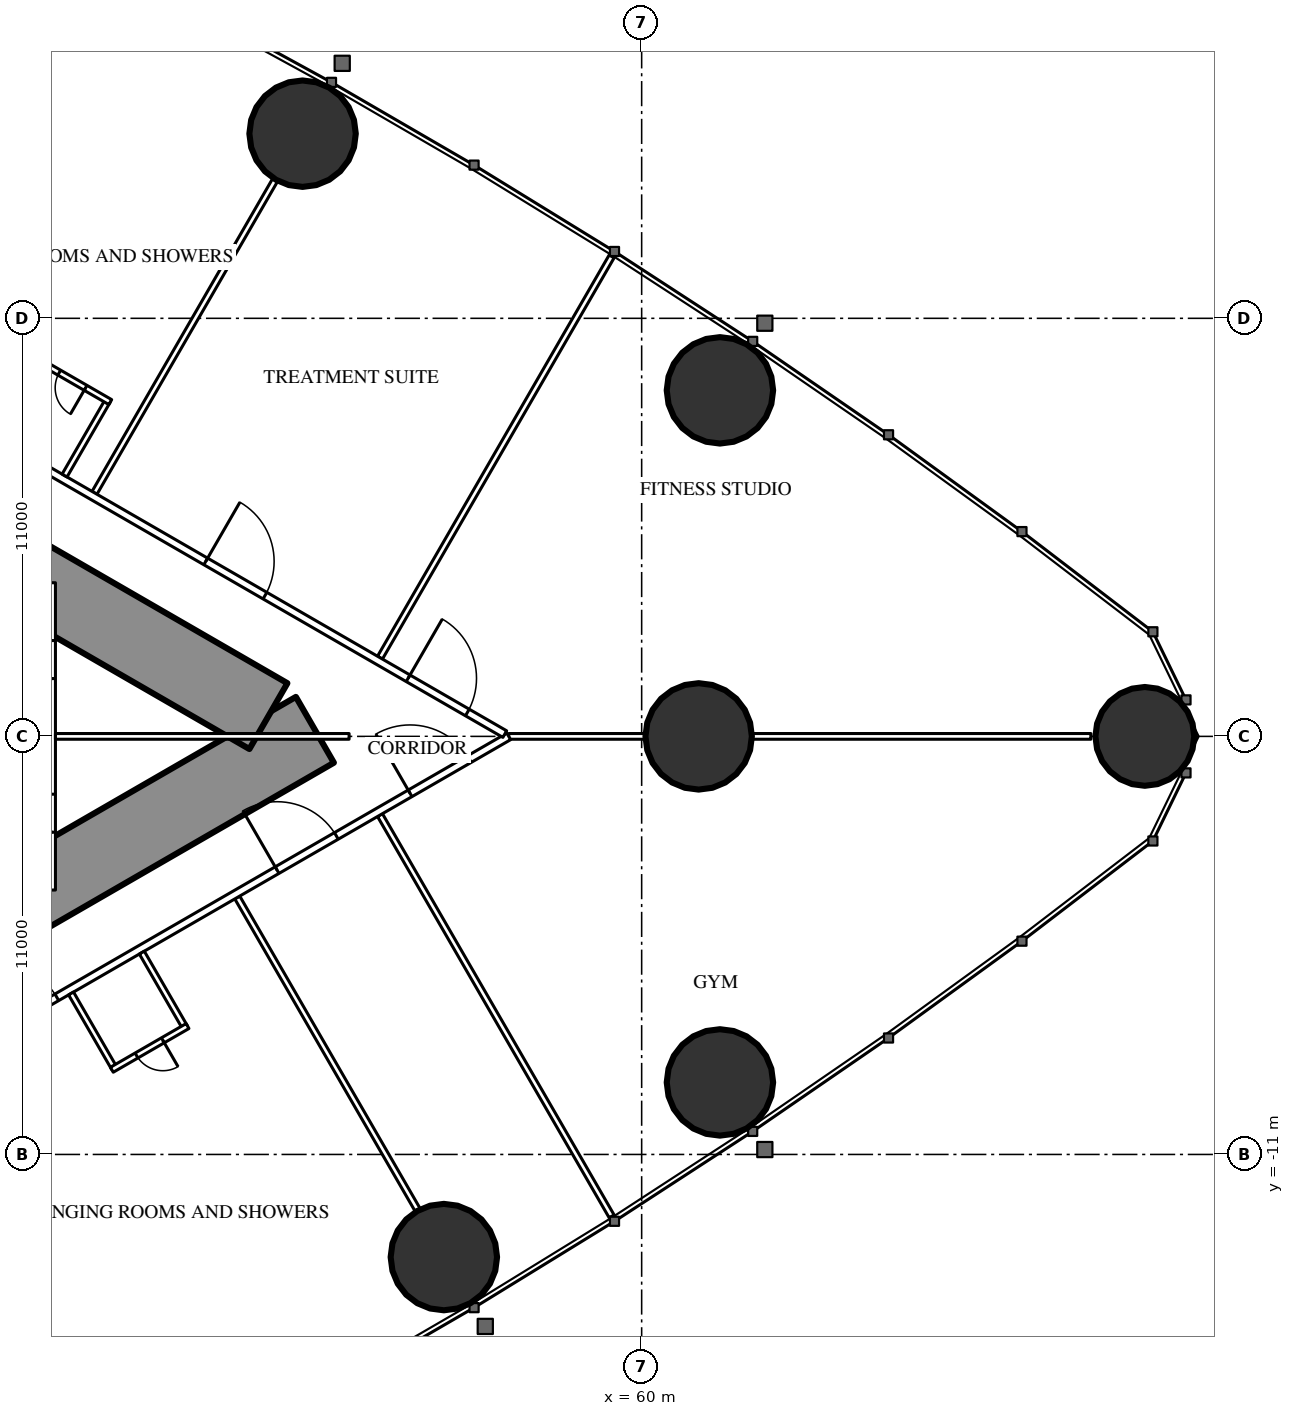
"""IFC4 building model, lengths in metres.
Left out: names, types, materials, properties, quantities, classifications, styles, units other than length and angle.
Written with IfcOpenShell. Run it as: python <this file> out.ifc"""

import sys

from ifc_helpers import new_model, si_unit, direction, frame, frame_2d, origin, origin_2d, place, context, subcontext, project, spatial, rectangle, hollow_circle, extrude, element, fill, save


model = new_model("IFC4")
c1 = context("Model", 3, precision=1e-05, world=origin(), true_north=direction((0.0, 1.0)))
c2 = subcontext(c1, "Body", "Model", "MODEL_VIEW")
j1 = project(units=[si_unit("LENGTHUNIT", "METRE"), si_unit("PLANEANGLEUNIT", "RADIAN")], contexts=[c1])
p1 = place(None, origin())
s1 = spatial("IfcSite", under=j1, at=p1, CompositionType="ELEMENT")
p2 = place(p1, origin())
s2 = spatial("IfcBuilding", under=s1, at=p2, CompositionType="ELEMENT")
p3 = place(p2, frame((0.0, 0.0, 12.6)))
s3 = spatial("IfcBuildingStorey", under=s2, at=p3, CompositionType="ELEMENT", Elevation=12.6)
p4 = place(p3, frame((73.239, 0.0, 0.0), z_axis=(0.0, 0.0, 1.0), x_axis=(1.0, 0.0, 0.0)))
e1 = element("IfcColumn", 1, at=p4, inside=s3, PredefinedType="COLUMN", context=c2, shape_type="SweptSolid", body=[
    extrude(hollow_circle(Radius=1.3, WallThickness=0.1, at=origin_2d()), origin(), (0.0, 0.0, 1.0), 5.4),
])
for number, where, z_axis, x_axis in (
    (2, (62.059, 9.105, 0.0), (0.0, 0.0, 1.0), (1.0, 0.0, 0.0)),
    (3, (51.078, 15.858, 0.0), (0.0, 0.0, 1.0), (1.0, 0.0, 0.0)),
    (4, (54.795, -13.701, 0.0), (0.0, 0.0, 1.0), (1.0, 0.0, 0.0)),
    (5, (62.059, -9.105, 0.0), (0.0, 0.0, 1.0), (1.0, 0.0, 0.0)),
):
    element("IfcColumn", number, at=place(p3, frame(where, z_axis=z_axis, x_axis=x_axis)), inside=s3, PredefinedType="COLUMN", context=c2, shape_type="SweptSolid", body=[
        extrude(hollow_circle(Radius=1.4, WallThickness=0.12, at=origin_2d()), origin(), (0.0, 0.0, 1.0), 5.4),
    ])
p5 = place(p3, frame((61.5, 0.0, 0.0), z_axis=(0.0, 0.0, 1.0), x_axis=(1.0, 0.0, 0.0)))
e6 = element("IfcColumn", 6, at=p5, inside=s3, PredefinedType="COLUMN", context=c2, shape_type="SweptSolid", body=[
    extrude(hollow_circle(Radius=1.4, WallThickness=0.1, at=origin_2d()), origin(), (0.0, 0.0, 1.0), 5.4),
])
p6 = place(p3, frame((27.2, -13.8, 0.0), z_axis=(0.0, 0.0, 1.0), x_axis=(0.866027159892, 0.499996958321, 0.0)))
e7 = element("IfcWall", 7, at=p6, inside=s3, PredefinedType="SHEAR", context=c2, shape_type="SweptSolid", body=[
    extrude(rectangle(XDim=27.947, YDim=2.0, at=frame_2d((13.973, 0.0))), origin(), (0.0, 0.0, 1.0), 5.4),
])
p7 = place(p6, frame((4.6, 0.0, 0.0)))
e8 = element("IfcOpeningElement", 8, at=p7, cuts=e7, PredefinedType="OPENING", context=c2, shape_type="SweptSolid", body=[
    extrude(rectangle(XDim=1.0, YDim=2.2, at=frame_2d((0.5, 1.1))), frame((0.0, 1.01, 0.0), z_axis=(0.0, -1.0, 0.0), x_axis=(1.0, 0.0, 0.0)), (0.0, 0.0, 1.0), 2.02),
])
p8 = place(p6, frame((13.395, 0.0, 0.0)))
e9 = element("IfcOpeningElement", 9, at=p8, cuts=e7, PredefinedType="OPENING", context=c2, shape_type="SweptSolid", body=[
    extrude(rectangle(XDim=1.8, YDim=2.2, at=frame_2d((0.9, 1.1))), frame((0.0, 1.01, 0.0), z_axis=(0.0, -1.0, 0.0), x_axis=(1.0, 0.0, 0.0)), (0.0, 0.0, 1.0), 2.02),
])
p9 = place(p3, frame((27.2, 13.8, 0.0), z_axis=(0.0, 0.0, 1.0), x_axis=(0.866024545924, -0.500001485854, 0.0)))
e10 = element("IfcWall", 10, at=p9, inside=s3, PredefinedType="SHEAR", context=c2, shape_type="SweptSolid", body=[
    extrude(rectangle(XDim=26.534, YDim=2.0, at=frame_2d((13.267, 0.0))), origin(), (0.0, 0.0, 1.0), 5.4),
])
p10 = place(p9, frame((4.6, 0.0, 0.0)))
e11 = element("IfcOpeningElement", 11, at=p10, cuts=e10, PredefinedType="OPENING", context=c2, shape_type="SweptSolid", body=[
    extrude(rectangle(XDim=1.0, YDim=2.2, at=frame_2d((0.5, 1.1))), frame((0.0, 1.01, 0.0), z_axis=(0.0, -1.0, 0.0), x_axis=(1.0, 0.0, 0.0)), (0.0, 0.0, 1.0), 2.02),
])
p11 = place(p9, frame((13.395, 0.0, 0.0)))
e12 = element("IfcOpeningElement", 12, at=p11, cuts=e10, PredefinedType="OPENING", context=c2, shape_type="SweptSolid", body=[
    extrude(rectangle(XDim=1.8, YDim=2.2, at=frame_2d((0.9, 1.1))), frame((0.0, 1.01, 0.0), z_axis=(0.0, -1.0, 0.0), x_axis=(1.0, 0.0, 0.0)), (0.0, 0.0, 1.0), 2.02),
])
p12 = place(p3, frame((49.36, -4.239, 0.0), z_axis=(0.0, 0.0, 1.0), x_axis=(0.499984446848, -0.866034383215, 0.0)))
e13 = element("IfcWall", 13, at=p12, inside=s3, PredefinedType="PARTITIONING", context=c2, shape_type="SweptSolid", body=[
    extrude(rectangle(XDim=9.491, YDim=0.15, at=frame_2d((4.746, 0.0))), origin(), (0.0, 0.0, 1.0), 4.15),
])
p13 = place(p3, frame((53.115, -2.071, 0.0), z_axis=(0.0, 0.0, 1.0), x_axis=(0.500000975677, -0.866024840476, 0.0)))
e14 = element("IfcWall", 14, at=p13, inside=s3, PredefinedType="PARTITIONING", context=c2, shape_type="SweptSolid", body=[
    extrude(rectangle(XDim=12.191, YDim=0.15, at=frame_2d((6.095, 0.0))), origin(), (0.0, 0.0, 1.0), 5.15),
])
p14 = place(p3, frame((45.603, 6.408, 0.0), z_axis=(0.0, 0.0, 1.0), x_axis=(0.499999740363, 0.866025553686, 0.0)))
e15 = element("IfcWall", 15, at=p14, inside=s3, PredefinedType="PARTITIONING", context=c2, shape_type="SweptSolid", body=[
    extrude(rectangle(XDim=9.501, YDim=0.15, at=frame_2d((4.751, 0.0))), origin(), (0.0, 0.0, 1.0), 4.15),
])
p15 = place(p3, frame((53.115, 2.071, 0.0), z_axis=(0.0, 0.0, 1.0), x_axis=(0.500000975677, 0.866024840476, 0.0)))
e16 = element("IfcWall", 16, at=p15, inside=s3, PredefinedType="PARTITIONING", context=c2, shape_type="SweptSolid", body=[
    extrude(rectangle(XDim=12.191, YDim=0.15, at=frame_2d((6.095, 0.0))), origin(), (0.0, 0.0, 1.0), 5.15),
])
p16 = place(p3, frame((56.502, 0.0, 0.0), z_axis=(0.0, 0.0, 1.0), x_axis=(1.0, 0.0, 0.0)))
e17 = element("IfcWall", 17, at=p16, inside=s3, PredefinedType="PARTITIONING", context=c2, shape_type="SweptSolid", body=[
    extrude(rectangle(XDim=15.317, YDim=0.15, at=frame_2d((7.658, 0.0))), origin(), (0.0, 0.0, 1.0), 4.15),
])
p17 = place(p3, frame((38.16, -10.59, 0.0), z_axis=(0.0, 0.0, 1.0), x_axis=(0.866027029586, 0.499997184019, 0.0)))
e18 = element("IfcWall", 18, at=p17, inside=s3, PredefinedType="PARTITIONING", context=c2, shape_type="SweptSolid", body=[
    extrude(rectangle(XDim=21.18, YDim=0.2, at=frame_2d((10.59, 0.0))), origin(), (0.0, 0.0, 1.0), 4.25),
])
p18 = place(p17, frame((14.142, 0.0, 0.0)))
e19 = element("IfcOpeningElement", 19, at=p18, cuts=e18, PredefinedType="OPENING", context=c2, shape_type="SweptSolid", body=[
    extrude(rectangle(XDim=1.8, YDim=2.2, at=frame_2d((0.9, 1.1))), frame((0.0, 0.11, 0.0), z_axis=(0.0, -1.0, 0.0), x_axis=(1.0, 0.0, 0.0)), (0.0, 0.0, 1.0), 0.22),
])
p19 = place(p17, frame((18.183, 0.0, 0.0)))
e20 = element("IfcOpeningElement", 20, at=p19, cuts=e18, PredefinedType="OPENING", context=c2, shape_type="SweptSolid", body=[
    extrude(rectangle(XDim=1.8, YDim=2.2, at=frame_2d((0.9, 1.1))), frame((0.0, 0.11, 0.0), z_axis=(0.0, -1.0, 0.0), x_axis=(1.0, 0.0, 0.0)), (0.0, 0.0, 1.0), 0.22),
])
p20 = place(p17, frame((5.65, 0.0, 0.0)))
e21 = element("IfcOpeningElement", 21, at=p20, cuts=e18, PredefinedType="OPENING", context=c2, shape_type="SweptSolid", body=[
    extrude(rectangle(XDim=1.8, YDim=2.2, at=frame_2d((0.9, 1.1))), frame((0.0, 0.11, 0.0), z_axis=(0.0, -1.0, 0.0), x_axis=(1.0, 0.0, 0.0)), (0.0, 0.0, 1.0), 0.22),
])
p21 = place(p3, frame((37.034, 11.24, 0.0), z_axis=(0.0, 0.0, 1.0), x_axis=(0.866025942536, -0.499999066854, 0.0)))
e22 = element("IfcWall", 22, at=p21, inside=s3, PredefinedType="PARTITIONING", context=c2, shape_type="SweptSolid", body=[
    extrude(rectangle(XDim=22.36, YDim=0.2, at=frame_2d((11.18, 0.0))), origin(), (0.0, 0.0, 1.0), 4.25),
])
p22 = place(p21, frame((19.423, 0.0, 0.0)))
e23 = element("IfcOpeningElement", 23, at=p22, cuts=e22, PredefinedType="OPENING", context=c2, shape_type="SweptSolid", body=[
    extrude(rectangle(XDim=1.8, YDim=2.2, at=frame_2d((0.9, 1.1))), frame((0.0, 0.11, 0.0), z_axis=(0.0, -1.0, 0.0), x_axis=(1.0, 0.0, 0.0)), (0.0, 0.0, 1.0), 0.22),
])
p23 = place(p21, frame((13.274, 0.0, 0.0)))
e24 = element("IfcOpeningElement", 24, at=p23, cuts=e22, PredefinedType="OPENING", context=c2, shape_type="SweptSolid", body=[
    extrude(rectangle(XDim=1.8, YDim=2.2, at=frame_2d((0.9, 1.1))), frame((0.0, 0.11, 0.0), z_axis=(0.0, -1.0, 0.0), x_axis=(1.0, 0.0, 0.0)), (0.0, 0.0, 1.0), 0.22),
])
p24 = place(p21, frame((4.602, 0.0, 0.0)))
e25 = element("IfcOpeningElement", 25, at=p24, cuts=e22, PredefinedType="OPENING", context=c2, shape_type="SweptSolid", body=[
    extrude(rectangle(XDim=1.8, YDim=2.2, at=frame_2d((0.9, 1.1))), frame((0.0, 0.11, 0.0), z_axis=(0.0, -1.0, 0.0), x_axis=(1.0, 0.0, 0.0)), (0.0, 0.0, 1.0), 0.22),
])
p25 = place(p3, frame((44.5, -4.043, 0.0), z_axis=(0.0, 0.0, 1.0), x_axis=(0.0, 1.0, 0.0)))
e26 = element("IfcWall", 26, at=p25, inside=s3, PredefinedType="PARTITIONING", context=c2, shape_type="SweptSolid", body=[
    extrude(rectangle(XDim=8.085, YDim=0.15, at=frame_2d((4.043, 0.0))), origin(), (0.0, 0.0, 1.0), 4.25),
])
p26 = place(p25, frame((1.521, 0.0, 0.0)))
e27 = element("IfcOpeningElement", 27, at=p26, cuts=e26, PredefinedType="OPENING", context=c2, shape_type="SweptSolid", body=[
    extrude(rectangle(XDim=1.0, YDim=2.2, at=frame_2d((0.5, 1.1))), frame((0.0, 0.085, 0.0), z_axis=(0.0, -1.0, 0.0), x_axis=(1.0, 0.0, 0.0)), (0.0, 0.0, 1.0), 0.17),
])
p27 = place(p25, frame((5.564, 0.0, 0.0)))
e28 = element("IfcOpeningElement", 28, at=p27, cuts=e26, PredefinedType="OPENING", context=c2, shape_type="SweptSolid", body=[
    extrude(rectangle(XDim=1.0, YDim=2.2, at=frame_2d((0.5, 1.1))), frame((0.0, 0.085, 0.0), z_axis=(0.0, -1.0, 0.0), x_axis=(1.0, 0.0, 0.0)), (0.0, 0.0, 1.0), 0.17),
])
p28 = place(p3, frame((44.575, 0.0, 0.0), z_axis=(0.0, 0.0, 1.0), x_axis=(1.0, 0.0, 0.0)))
e29 = element("IfcWall", 29, at=p28, inside=s3, PredefinedType="PARTITIONING", context=c2, shape_type="SweptSolid", body=[
    extrude(rectangle(XDim=7.727, YDim=0.15, at=frame_2d((3.864, 0.0))), origin(), (0.0, 0.0, 1.0), 4.15),
])
p29 = place(p3, frame((44.815, 6.863, 0.0), z_axis=(0.0, 0.0, 1.0), x_axis=(0.499982560684, 0.866035472144, 0.0)))
e30 = element("IfcWall", 30, at=p29, inside=s3, PredefinedType="PARTITIONING", context=c2, shape_type="SweptSolid", body=[
    extrude(rectangle(XDim=2.275, YDim=0.15, at=frame_2d((1.137, 0.0))), origin(), (0.0, 0.0, 1.0), 5.15),
])
p30 = place(p3, frame((44.026, 9.946, 0.0), z_axis=(0.0, 0.0, 1.0), x_axis=(0.865980515519, -0.500077740698, 0.0)))
e31 = element("IfcWall", 31, at=p30, inside=s3, PredefinedType="PARTITIONING", context=c2, shape_type="SweptSolid", body=[
    extrude(rectangle(XDim=2.3, YDim=0.15, at=frame_2d((1.15, 0.0))), origin(), (0.0, 0.0, 1.0), 5.15),
])
p31 = place(p30, frame((0.75, 0.0, 0.0)))
e32 = element("IfcOpeningElement", 32, at=p31, cuts=e31, PredefinedType="OPENING", context=c2, shape_type="SweptSolid", body=[
    extrude(rectangle(XDim=0.8, YDim=2.2, at=frame_2d((0.4, 1.1))), frame((0.0, 0.085, 0.0), z_axis=(0.0, -1.0, 0.0), x_axis=(1.0, 0.0, 0.0)), (0.0, 0.0, 1.0), 0.17),
])
for number, where, z_axis, x_axis in (
    (33, (44.986, -6.764, 0.0), (0.0, 0.0, 1.0), (0.5, -0.866, 0.0)),
    (34, (46.848, -5.689, 0.0), (0.0, 0.0, 1.0), (0.5, -0.866, 0.0)),
):
    element("IfcWall", number, at=place(p3, frame(where, z_axis=z_axis, x_axis=x_axis)), inside=s3, PredefinedType="PARTITIONING", context=c2, shape_type="SweptSolid", body=[
        extrude(rectangle(XDim=2.275, YDim=0.15, at=frame_2d((1.137, 0.0))), origin(), (0.0, 0.0, 1.0), 5.15),
    ])
p32 = place(p3, frame((46.059, -8.772, 0.0), z_axis=(0.0, 0.0, 1.0), x_axis=(0.866007057882, 0.500031774688, 0.0)))
e35 = element("IfcWall", 35, at=p32, inside=s3, PredefinedType="PARTITIONING", context=c2, shape_type="SweptSolid", body=[
    extrude(rectangle(XDim=2.3, YDim=0.15, at=frame_2d((1.15, 0.0))), origin(), (0.0, 0.0, 1.0), 5.15),
])
p33 = place(p32, frame((0.75, 0.0, 0.0)))
e36 = element("IfcOpeningElement", 36, at=p33, cuts=e35, PredefinedType="OPENING", context=c2, shape_type="SweptSolid", body=[
    extrude(rectangle(XDim=0.8, YDim=2.2, at=frame_2d((0.4, 1.1))), frame((0.0, 0.085, 0.0), z_axis=(0.0, -1.0, 0.0), x_axis=(1.0, 0.0, 0.0)), (0.0, 0.0, 1.0), 0.17),
])
p34 = place(p18, origin())
e37 = element("IfcDoor", 37, at=p34, inside=s3, OperationType="DOUBLE_DOOR_SINGLE_SWING", PredefinedType="DOOR", context=c2, shape_type="SweptSolid", body=[
    extrude(rectangle(XDim=1.8, YDim=2.2, at=frame_2d((0.9, 1.1))), frame((0.0, 0.025, 0.0), z_axis=(0.0, -1.0, 0.0), x_axis=(1.0, 0.0, 0.0)), (0.0, 0.0, 1.0), 0.05),
])
fill(e19, e37)
p35 = place(p19, origin())
e38 = element("IfcDoor", 38, at=p35, inside=s3, OperationType="DOUBLE_DOOR_SINGLE_SWING", PredefinedType="DOOR", context=c2, shape_type="SweptSolid", body=[
    extrude(rectangle(XDim=1.8, YDim=2.2, at=frame_2d((0.9, 1.1))), frame((0.0, 0.025, 0.0), z_axis=(0.0, -1.0, 0.0), x_axis=(1.0, 0.0, 0.0)), (0.0, 0.0, 1.0), 0.05),
])
fill(e20, e38)
p36 = place(p22, origin())
e39 = element("IfcDoor", 39, at=p36, inside=s3, OperationType="DOUBLE_DOOR_SINGLE_SWING", PredefinedType="DOOR", context=c2, shape_type="SweptSolid", body=[
    extrude(rectangle(XDim=1.8, YDim=2.2, at=frame_2d((0.9, 1.1))), frame((0.0, 0.025, 0.0), z_axis=(0.0, -1.0, 0.0), x_axis=(1.0, 0.0, 0.0)), (0.0, 0.0, 1.0), 0.05),
])
fill(e23, e39)
p37 = place(p23, origin())
e40 = element("IfcDoor", 40, at=p37, inside=s3, OperationType="DOUBLE_DOOR_SINGLE_SWING", PredefinedType="DOOR", context=c2, shape_type="SweptSolid", body=[
    extrude(rectangle(XDim=1.8, YDim=2.2, at=frame_2d((0.9, 1.1))), frame((0.0, 0.025, 0.0), z_axis=(0.0, -1.0, 0.0), x_axis=(1.0, 0.0, 0.0)), (0.0, 0.0, 1.0), 0.05),
])
fill(e24, e40)
p38 = place(p20, origin())
e41 = element("IfcDoor", 41, at=p38, inside=s3, OperationType="DOUBLE_DOOR_SINGLE_SWING", PredefinedType="DOOR", context=c2, shape_type="SweptSolid", body=[
    extrude(rectangle(XDim=1.8, YDim=2.2, at=frame_2d((0.9, 1.1))), frame((0.0, 0.025, 0.0), z_axis=(0.0, -1.0, 0.0), x_axis=(1.0, 0.0, 0.0)), (0.0, 0.0, 1.0), 0.05),
])
fill(e21, e41)
p39 = place(p26, origin())
e42 = element("IfcDoor", 42, at=p39, inside=s3, OperationType="SINGLE_SWING_LEFT", PredefinedType="DOOR", context=c2, shape_type="SweptSolid", body=[
    extrude(rectangle(XDim=1.0, YDim=2.2, at=frame_2d((0.5, 1.1))), frame((0.0, 0.025, 0.0), z_axis=(0.0, -1.0, 0.0), x_axis=(1.0, 0.0, 0.0)), (0.0, 0.0, 1.0), 0.05),
])
fill(e27, e42)
p40 = place(p27, origin())
e43 = element("IfcDoor", 43, at=p40, inside=s3, OperationType="SINGLE_SWING_LEFT", PredefinedType="DOOR", context=c2, shape_type="SweptSolid", body=[
    extrude(rectangle(XDim=1.0, YDim=2.2, at=frame_2d((0.5, 1.1))), frame((0.0, 0.025, 0.0), z_axis=(0.0, -1.0, 0.0), x_axis=(1.0, 0.0, 0.0)), (0.0, 0.0, 1.0), 0.05),
])
fill(e28, e43)
p41 = place(p31, origin())
e44 = element("IfcDoor", 44, at=p41, inside=s3, OperationType="SINGLE_SWING_RIGHT", PredefinedType="DOOR", context=c2, shape_type="SweptSolid", body=[
    extrude(rectangle(XDim=0.8, YDim=2.2, at=frame_2d((0.4, 1.1))), frame((0.0, 0.025, 0.0), z_axis=(0.0, -1.0, 0.0), x_axis=(1.0, 0.0, 0.0)), (0.0, 0.0, 1.0), 0.05),
])
fill(e32, e44)
p42 = place(p33, origin())
e45 = element("IfcDoor", 45, at=p42, inside=s3, OperationType="SINGLE_SWING_RIGHT", PredefinedType="DOOR", context=c2, shape_type="SweptSolid", body=[
    extrude(rectangle(XDim=0.8, YDim=2.2, at=frame_2d((0.4, 1.1))), frame((0.0, 0.025, 0.0), z_axis=(0.0, -1.0, 0.0), x_axis=(1.0, 0.0, 0.0)), (0.0, 0.0, 1.0), 0.05),
])
fill(e36, e45)
save(model, sys.argv[1])
